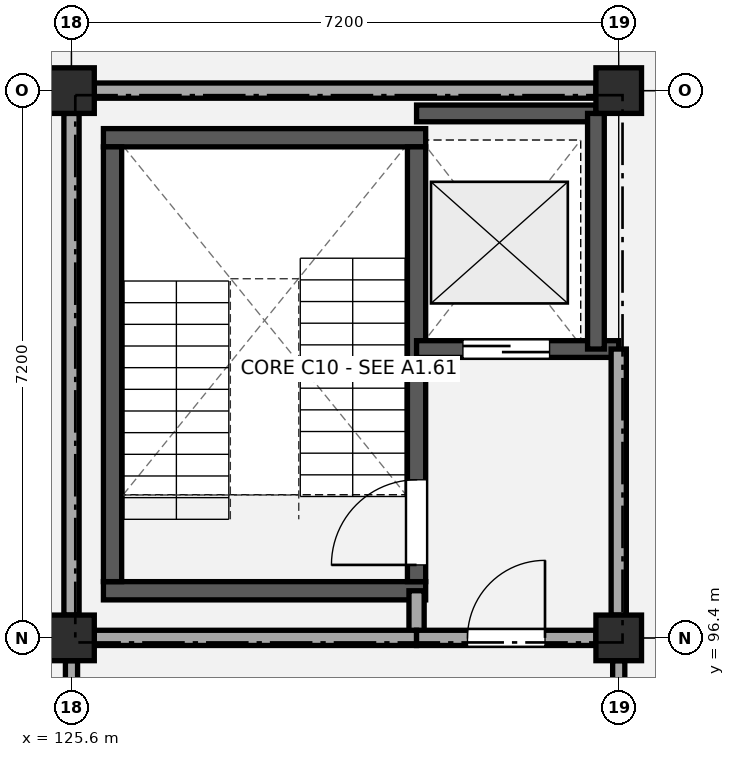
"""IFC4 building model, lengths in metres.
Left out: names, types, materials, properties, quantities, classifications, styles, units other than length and angle.
Written with IfcOpenShell. Run it as: python <this file> out.ifc"""

import sys

from ifc_helpers import new_model, si_unit, direction, frame, frame_2d, origin, origin_2d, place, context, subcontext, project, spatial, rectangle, extrude, element, fill, save


model = new_model("IFC4")
c1 = context("Model", 3, precision=1e-05, world=origin(), true_north=direction((0.0, 1.0)))
c2 = subcontext(c1, "Body", "Model", "MODEL_VIEW")
j1 = project(units=[si_unit("LENGTHUNIT", "METRE"), si_unit("PLANEANGLEUNIT", "RADIAN")], contexts=[c1])
p1 = place(None, origin())
s1 = spatial("IfcSite", under=j1, at=p1, CompositionType="ELEMENT")
p2 = place(p1, origin())
s2 = spatial("IfcBuilding", under=s1, at=p2, CompositionType="ELEMENT")
p3 = place(p2, frame((0.0, 0.0, 13.5)))
s3 = spatial("IfcBuildingStorey", under=s2, at=p3, CompositionType="ELEMENT", Elevation=13.5)
for number, where, z_axis, x_axis in (
    (1, (125.6, 96.4, 0.0), (0.0, 0.0, 1.0), (1.0, 0.0, 0.0)),
    (2, (125.6, 103.6, 0.0), (0.0, 0.0, 1.0), (1.0, 0.0, 0.0)),
    (3, (132.8, 96.4, 0.0), (0.0, 0.0, 1.0), (1.0, 0.0, 0.0)),
    (4, (132.8, 103.6, 0.0), (0.0, 0.0, 1.0), (1.0, 0.0, 0.0)),
):
    element("IfcColumn", number, at=place(p3, frame(where, z_axis=z_axis, x_axis=x_axis)), inside=s3, PredefinedType="COLUMN", context=c2, shape_type="SweptSolid", body=[
        extrude(rectangle(XDim=0.6, YDim=0.6, at=origin_2d()), origin(), (0.0, 0.0, 1.0), 4.14),
    ])
for number, where, z_axis, x_axis in (
    (5, (126.02, 97.02, 0.0), (0.0, 0.0, 1.0), (1.0, 0.0, 0.0)),
    (6, (126.02, 102.98, 0.0), (0.0, 0.0, 1.0), (1.0, 0.0, 0.0)),
):
    element("IfcWall", number, at=place(p3, frame(where, z_axis=z_axis, x_axis=x_axis)), inside=s3, PredefinedType="SHEAR", context=c2, shape_type="SweptSolid", body=[
        extrude(rectangle(XDim=4.24, YDim=0.24, at=frame_2d((2.12, 0.0))), origin(), (0.0, 0.0, 1.0), 3.88),
    ])
p4 = place(p3, frame((126.14, 97.14, 0.0), z_axis=(0.0, 0.0, 1.0), x_axis=(0.0, 1.0, 0.0)))
e7 = element("IfcWall", 7, at=p4, inside=s3, PredefinedType="SHEAR", context=c2, shape_type="SweptSolid", body=[
    extrude(rectangle(XDim=5.72, YDim=0.24, at=frame_2d((2.86, 0.0))), origin(), (0.0, 0.0, 1.0), 3.88),
])
p5 = place(p3, frame((130.14, 97.14, 0.0), z_axis=(0.0, 0.0, 1.0), x_axis=(0.0, 1.0, 0.0)))
e8 = element("IfcWall", 8, at=p5, inside=s3, PredefinedType="SHEAR", context=c2, shape_type="SweptSolid", body=[
    extrude(rectangle(XDim=5.72, YDim=0.24, at=frame_2d((2.86, 0.0))), origin(), (0.0, 0.0, 1.0), 3.88),
])
p6 = place(p5, frame((0.22, 0.0, 0.0)))
e9 = element("IfcOpeningElement", 9, at=p6, cuts=e8, PredefinedType="OPENING", context=c2, shape_type="SweptSolid", body=[
    extrude(rectangle(XDim=1.12, YDim=2.15, at=frame_2d((0.56, 1.075))), frame((0.0, 0.13, 0.0), z_axis=(0.0, -1.0, 0.0), x_axis=(1.0, 0.0, 0.0)), (0.0, 0.0, 1.0), 0.26),
])
p7 = place(p3, frame((130.14, 100.2, 0.0), z_axis=(0.0, 0.0, 1.0), x_axis=(1.0, 0.0, 0.0)))
e10 = element("IfcWall", 10, at=p7, inside=s3, PredefinedType="SHEAR", context=c2, shape_type="SweptSolid", body=[
    extrude(rectangle(XDim=2.66, YDim=0.22, at=frame_2d((1.33, 0.0))), origin(), (0.0, 0.0, 1.0), 3.88),
])
p8 = place(p7, frame((0.61, 0.0, 0.0)))
e11 = element("IfcOpeningElement", 11, at=p8, cuts=e10, PredefinedType="OPENING", context=c2, shape_type="SweptSolid", body=[
    extrude(rectangle(XDim=1.14, YDim=2.15, at=frame_2d((0.57, 1.075))), frame((0.0, 0.12, 0.0), z_axis=(0.0, -1.0, 0.0), x_axis=(1.0, 0.0, 0.0)), (0.0, 0.0, 1.0), 0.24),
])
p9 = place(p3, frame((130.14, 103.3, 0.0), z_axis=(0.0, 0.0, 1.0), x_axis=(1.0, 0.0, 0.0)))
e12 = element("IfcWall", 12, at=p9, inside=s3, PredefinedType="SHEAR", context=c2, shape_type="SweptSolid", body=[
    extrude(rectangle(XDim=2.36, YDim=0.22, at=frame_2d((1.18, 0.0))), origin(), (0.0, 0.0, 1.0), 3.88),
])
p10 = place(p3, frame((132.5, 100.2, 0.0), z_axis=(0.0, 0.0, 1.0), x_axis=(0.0, 1.0, 0.0)))
e13 = element("IfcWall", 13, at=p10, inside=s3, PredefinedType="SHEAR", context=c2, shape_type="SweptSolid", body=[
    extrude(rectangle(XDim=3.1, YDim=0.22, at=frame_2d((1.55, 0.0))), origin(), (0.0, 0.0, 1.0), 3.88),
])
p11 = place(p3, frame((130.14, 96.4, 0.0), z_axis=(0.0, 0.0, 1.0), x_axis=(0.0, 1.0, 0.0)))
e14 = element("IfcWall", 14, at=p11, inside=s3, PredefinedType="PARTITIONING", context=c2, shape_type="SweptSolid", body=[
    extrude(rectangle(XDim=0.62, YDim=0.2, at=frame_2d((0.31, 0.0))), origin(), (0.0, 0.0, 1.0), 3.22),
])
p12 = place(p3, frame((125.6, 96.7, 0.0), z_axis=(0.0, 0.0, 1.0), x_axis=(0.0, 1.0, 0.0)))
e15 = element("IfcWall", 15, at=p12, inside=s3, PredefinedType="PARTITIONING", context=c2, shape_type="SweptSolid", body=[
    extrude(rectangle(XDim=6.6, YDim=0.2, at=frame_2d((3.3, 0.0))), origin(), (0.0, 0.0, 1.0), 3.25),
])
p13 = place(p3, frame((132.8, 96.7, 0.0), z_axis=(0.0, 0.0, 1.0), x_axis=(0.0, 1.0, 0.0)))
e16 = element("IfcWall", 16, at=p13, inside=s3, PredefinedType="PARTITIONING", context=c2, shape_type="SweptSolid", body=[
    extrude(rectangle(XDim=3.5, YDim=0.2, at=frame_2d((1.75, 0.0))), origin(), (0.0, 0.0, 1.0), 3.25),
])
p14 = place(p3, frame((125.9, 96.4, 0.0), z_axis=(0.0, 0.0, 1.0), x_axis=(1.0, 0.0, 0.0)))
e17 = element("IfcWall", 17, at=p14, inside=s3, PredefinedType="PARTITIONING", context=c2, shape_type="SweptSolid", body=[
    extrude(rectangle(XDim=4.24, YDim=0.2, at=frame_2d((2.12, 0.0))), origin(), (0.0, 0.0, 1.0), 3.22),
])
p15 = place(p3, frame((130.14, 96.4, 0.0), z_axis=(0.0, 0.0, 1.0), x_axis=(1.0, 0.0, 0.0)))
e18 = element("IfcWall", 18, at=p15, inside=s3, PredefinedType="PARTITIONING", context=c2, shape_type="SweptSolid", body=[
    extrude(rectangle(XDim=2.36, YDim=0.2, at=frame_2d((1.18, 0.0))), origin(), (0.0, 0.0, 1.0), 3.22),
])
p16 = place(p15, frame((0.67, 0.0, 0.0)))
e19 = element("IfcOpeningElement", 19, at=p16, cuts=e18, PredefinedType="OPENING", context=c2, shape_type="SweptSolid", body=[
    extrude(rectangle(XDim=1.02, YDim=2.15, at=frame_2d((0.51, 1.075))), frame((0.0, 0.11, 0.0), z_axis=(0.0, -1.0, 0.0), x_axis=(1.0, 0.0, 0.0)), (0.0, 0.0, 1.0), 0.22),
])
p17 = place(p3, frame((125.9, 103.6, 0.0), z_axis=(0.0, 0.0, 1.0), x_axis=(1.0, 0.0, 0.0)))
e20 = element("IfcWall", 20, at=p17, inside=s3, PredefinedType="PARTITIONING", context=c2, shape_type="SweptSolid", body=[
    extrude(rectangle(XDim=6.6, YDim=0.2, at=frame_2d((3.3, 0.0))), origin(), (0.0, 0.0, 1.0), 3.27),
])
p18 = place(p3, frame((125.6, 89.5, 0.0), z_axis=(0.0, 0.0, 1.0), x_axis=(0.0, 1.0, 0.0)))
e21 = element("IfcWall", 21, at=p18, inside=s3, PredefinedType="PARTITIONING", context=c2, shape_type="SweptSolid", body=[
    extrude(rectangle(XDim=6.6, YDim=0.16, at=frame_2d((3.3, 0.0))), origin(), (0.0, 0.0, 1.0), 3.2),
])
p19 = place(p18, frame((2.81, 0.0, 0.0)))
e22 = element("IfcOpeningElement", 22, at=p19, cuts=e21, PredefinedType="OPENING", context=c2, shape_type="SweptSolid", body=[
    extrude(rectangle(XDim=0.98, YDim=2.12, at=frame_2d((0.49, 1.06))), frame((0.0, 0.09, 0.0), z_axis=(0.0, -1.0, 0.0), x_axis=(1.0, 0.0, 0.0)), (0.0, 0.0, 1.0), 0.18),
])
p20 = place(p3, frame((132.8, 89.5, 0.0), z_axis=(0.0, 0.0, 1.0), x_axis=(0.0, 1.0, 0.0)))
e23 = element("IfcWall", 23, at=p20, inside=s3, PredefinedType="PARTITIONING", context=c2, shape_type="SweptSolid", body=[
    extrude(rectangle(XDim=6.6, YDim=0.16, at=frame_2d((3.3, 0.0))), origin(), (0.0, 0.0, 1.0), 3.2),
])
p21 = place(p6, origin())
e24 = element("IfcDoor", 24, at=p21, inside=s3, OperationType="SINGLE_SWING_LEFT", PredefinedType="DOOR", context=c2, shape_type="SweptSolid", body=[
    extrude(rectangle(XDim=1.12, YDim=2.15, at=frame_2d((0.56, 1.075))), frame((0.0, 0.025, 0.0), z_axis=(0.0, -1.0, 0.0), x_axis=(1.0, 0.0, 0.0)), (0.0, 0.0, 1.0), 0.05),
])
fill(e9, e24)
p22 = place(p8, origin())
e25 = element("IfcDoor", 25, at=p22, inside=s3, OperationType="SLIDING_TO_LEFT", PredefinedType="DOOR", context=c2, shape_type="SweptSolid", body=[
    extrude(rectangle(XDim=1.14, YDim=2.15, at=frame_2d((0.57, 1.075))), frame((0.0, 0.025, 0.0), z_axis=(0.0, -1.0, 0.0), x_axis=(1.0, 0.0, 0.0)), (0.0, 0.0, 1.0), 0.05),
])
fill(e11, e25)
p23 = place(p16, origin())
e26 = element("IfcDoor", 26, at=p23, inside=s3, OperationType="SINGLE_SWING_RIGHT", PredefinedType="DOOR", context=c2, shape_type="SweptSolid", body=[
    extrude(rectangle(XDim=1.02, YDim=2.15, at=frame_2d((0.51, 1.075))), frame((0.0, 0.025, 0.0), z_axis=(0.0, -1.0, 0.0), x_axis=(1.0, 0.0, 0.0)), (0.0, 0.0, 1.0), 0.05),
])
fill(e19, e26)
save(model, sys.argv[1])
